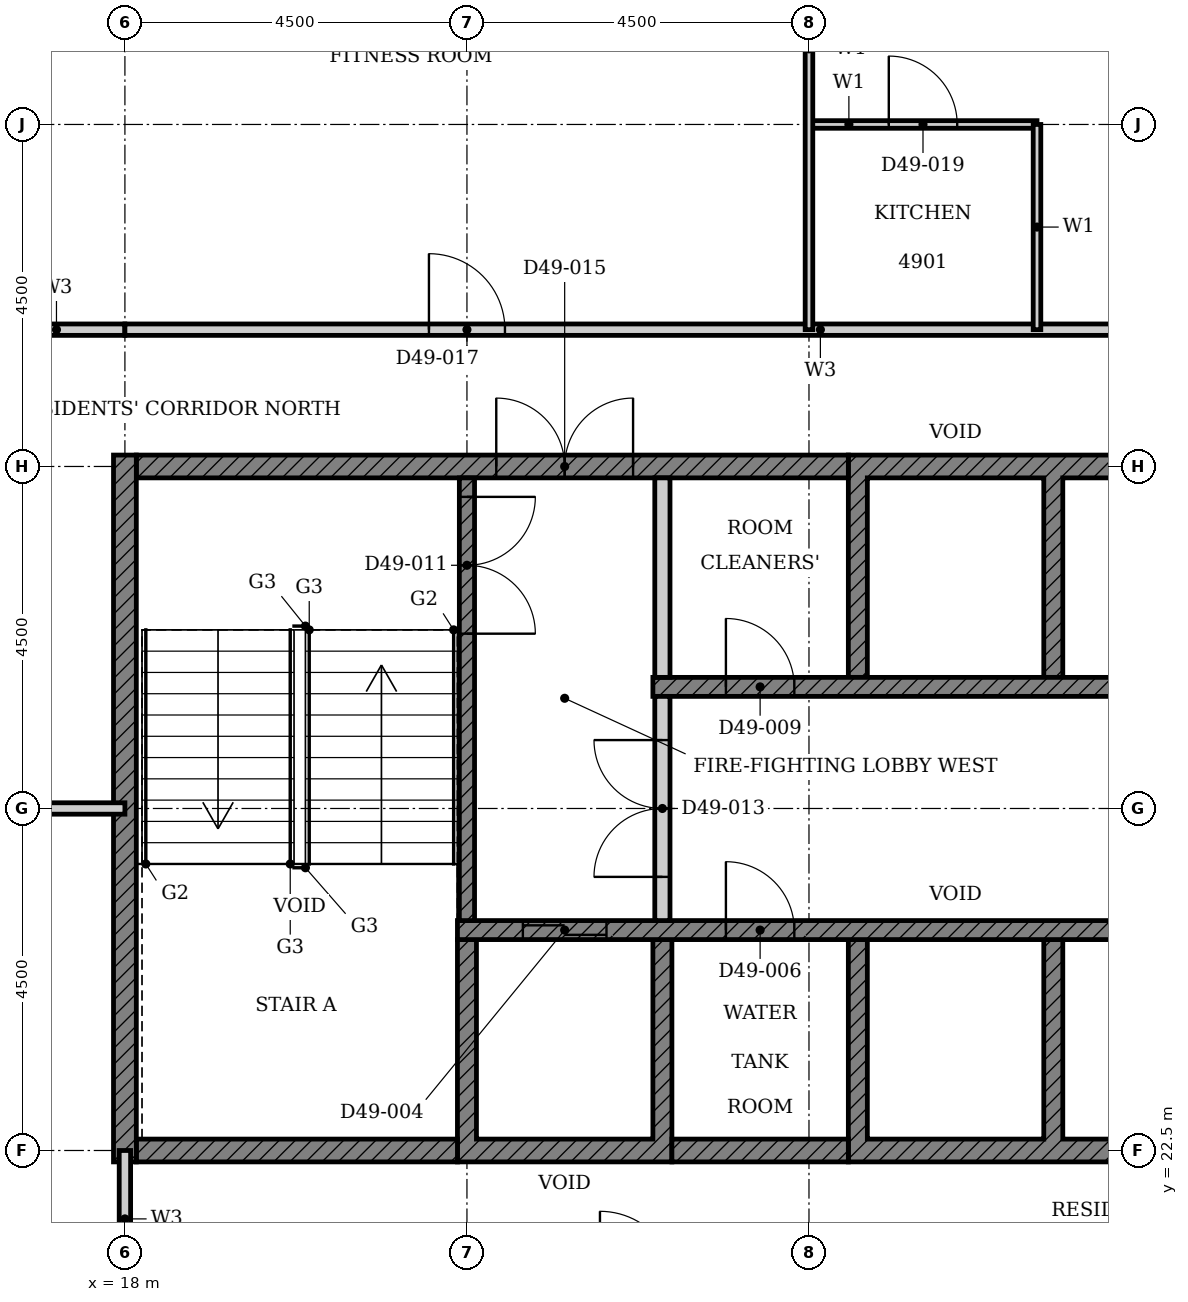
"""IFC4 building model, lengths in metres.
Left out: names, types, materials, properties, quantities, classifications, styles, units other than length and angle.
Written with IfcOpenShell. Run it as: python <this file> out.ifc"""

import sys

from ifc_helpers import new_model, si_unit, direction, frame, frame_2d, origin, place, context, subcontext, project, spatial, polyline, rectangle, outline, extrude, element, fill, save


model = new_model("IFC4")
c1 = context("Model", 3, precision=1e-05, world=origin(), true_north=direction((0.0, 1.0)))
c2 = subcontext(c1, "Body", "Model", "MODEL_VIEW")
j1 = project(units=[si_unit("LENGTHUNIT", "METRE"), si_unit("PLANEANGLEUNIT", "RADIAN")], contexts=[c1])
p1 = place(None, origin())
s1 = spatial("IfcSite", under=j1, at=p1, CompositionType="ELEMENT")
p2 = place(p1, origin())
s2 = spatial("IfcBuilding", under=s1, at=p2, CompositionType="ELEMENT")
p3 = place(p2, frame((0.0, 0.0, 196.1)))
s3 = spatial("IfcBuildingStorey", under=s2, at=p3, CompositionType="ELEMENT", Elevation=196.1)
p4 = place(p3, origin())
e1 = element("IfcWall", 1, at=p4, inside=s3, PredefinedType="SHEAR", context=c2, shape_type="SweptSolid", body=[
    extrude(outline(polyline([(22.375, 22.35), (25.197, 22.35), (25.197, 25.275), (24.947, 25.275), (24.947, 22.65), (22.625, 22.65), (22.625, 25.275), (22.375, 25.275), (22.375, 22.35)])), origin(), (0.0, 0.0, 1.0), 3.4),
])
p5 = place(p3, origin())
e2 = element("IfcWall", 2, at=p5, inside=s3, PredefinedType="SHEAR", context=c2, shape_type="SweptSolid", body=[
    extrude(outline(polyline([(27.518, 22.35), (32.911, 22.35), (32.911, 25.275), (32.661, 25.275), (32.661, 22.65), (30.339, 22.65), (30.339, 25.275), (30.089, 25.275), (30.089, 22.65), (27.768, 22.65), (27.768, 25.275), (27.518, 25.275), (27.518, 22.35)])), origin(), (0.0, 0.0, 1.0), 3.4),
])
p6 = place(p3, origin())
e3 = element("IfcWall", 3, at=p6, inside=s3, PredefinedType="SHEAR", context=c2, shape_type="SweptSolid", body=[
    extrude(outline(polyline([(27.518, 28.725), (27.768, 28.725), (27.768, 31.35), (30.089, 31.35), (30.089, 28.725), (30.339, 28.725), (30.339, 31.35), (32.661, 31.35), (32.661, 28.725), (32.911, 28.725), (32.911, 31.65), (27.518, 31.65), (27.518, 28.725)])), origin(), (0.0, 0.0, 1.0), 3.4),
])
p7 = place(p3, frame((18.15, 22.5, 0.0), z_axis=(0.0, 0.0, 1.0), x_axis=(1.0, 0.0, 0.0)))
e4 = element("IfcWall", 4, at=p7, inside=s3, PredefinedType="SHEAR", context=c2, shape_type="SweptSolid", body=[
    extrude(rectangle(XDim=4.225, YDim=0.3, at=frame_2d((2.113, 0.0))), origin(), (0.0, 0.0, 1.0), 3.4),
])
p8 = place(p3, frame((25.197, 22.5, 0.0), z_axis=(0.0, 0.0, 1.0), x_axis=(1.0, 0.0, 0.0)))
e5 = element("IfcWall", 5, at=p8, inside=s3, PredefinedType="SHEAR", context=c2, shape_type="SweptSolid", body=[
    extrude(rectangle(XDim=2.321, YDim=0.3, at=frame_2d((1.161, 0.0))), origin(), (0.0, 0.0, 1.0), 3.4),
])
p9 = place(p3, frame((18.15, 31.5, 0.0), z_axis=(0.0, 0.0, 1.0), x_axis=(1.0, 0.0, 0.0)))
e6 = element("IfcWall", 6, at=p9, inside=s3, PredefinedType="SHEAR", context=c2, shape_type="SweptSolid", body=[
    extrude(rectangle(XDim=9.368, YDim=0.3, at=frame_2d((4.684, 0.0))), origin(), (0.0, 0.0, 1.0), 3.4),
])
p10 = place(p9, frame((4.736, 0.0, 0.0)))
e7 = element("IfcOpeningElement", 7, at=p10, cuts=e6, PredefinedType="OPENING", context=c2, shape_type="SweptSolid", body=[
    extrude(rectangle(XDim=1.8, YDim=2.1, at=frame_2d((0.9, 1.05))), frame((0.0, 0.16, 0.0), z_axis=(0.0, -1.0, 0.0), x_axis=(1.0, 0.0, 0.0)), (0.0, 0.0, 1.0), 0.32),
])
p11 = place(p3, frame((18.0, 22.35, 0.0), z_axis=(0.0, 0.0, 1.0), x_axis=(0.0, 1.0, 0.0)))
e8 = element("IfcWall", 8, at=p11, inside=s3, PredefinedType="SHEAR", context=c2, shape_type="SweptSolid", body=[
    extrude(rectangle(XDim=9.3, YDim=0.3, at=frame_2d((4.65, 0.0))), origin(), (0.0, 0.0, 1.0), 3.4),
])
p12 = place(p3, frame((22.375, 25.4, 0.0), z_axis=(0.0, 0.0, 1.0), x_axis=(1.0, 0.0, 0.0)))
e9 = element("IfcWall", 9, at=p12, inside=s3, PredefinedType="SHEAR", context=c2, shape_type="SweptSolid", body=[
    extrude(rectangle(XDim=15.678, YDim=0.25, at=frame_2d((7.839, 0.0))), origin(), (0.0, 0.0, 1.0), 3.4),
])
p13 = place(p12, frame((8.575, 0.0, 0.0)))
e10 = element("IfcOpeningElement", 10, at=p13, cuts=e9, PredefinedType="OPENING", context=c2, shape_type="SweptSolid", body=[
    extrude(rectangle(XDim=1.1, YDim=2.1, at=frame_2d((0.55, 1.05))), frame((0.0, 0.135, 0.0), z_axis=(0.0, -1.0, 0.0), x_axis=(1.0, 0.0, 0.0)), (0.0, 0.0, 1.0), 0.27),
])
p14 = place(p12, frame((0.861, 0.0, 0.0)))
e11 = element("IfcOpeningElement", 11, at=p14, cuts=e9, PredefinedType="OPENING", context=c2, shape_type="SweptSolid", body=[
    extrude(rectangle(XDim=1.1, YDim=2.1, at=frame_2d((0.55, 1.05))), frame((0.0, 0.135, 0.0), z_axis=(0.0, -1.0, 0.0), x_axis=(1.0, 0.0, 0.0)), (0.0, 0.0, 1.0), 0.27),
])
p15 = place(p12, frame((3.532, 0.0, 0.0)))
e12 = element("IfcOpeningElement", 12, at=p15, cuts=e9, PredefinedType="OPENING", context=c2, shape_type="SweptSolid", body=[
    extrude(rectangle(XDim=0.9, YDim=2.1, at=frame_2d((0.45, 1.05))), frame((0.0, 0.135, 0.0), z_axis=(0.0, -1.0, 0.0), x_axis=(1.0, 0.0, 0.0)), (0.0, 0.0, 1.0), 0.27),
])
p16 = place(p12, frame((11.246, 0.0, 0.0)))
e13 = element("IfcOpeningElement", 13, at=p16, cuts=e9, PredefinedType="OPENING", context=c2, shape_type="SweptSolid", body=[
    extrude(rectangle(XDim=0.9, YDim=2.1, at=frame_2d((0.45, 1.05))), frame((0.0, 0.135, 0.0), z_axis=(0.0, -1.0, 0.0), x_axis=(1.0, 0.0, 0.0)), (0.0, 0.0, 1.0), 0.27),
])
p17 = place(p12, frame((13.818, 0.0, 0.0)))
e14 = element("IfcOpeningElement", 14, at=p17, cuts=e9, PredefinedType="OPENING", context=c2, shape_type="SweptSolid", body=[
    extrude(rectangle(XDim=0.9, YDim=2.1, at=frame_2d((0.45, 1.05))), frame((0.0, 0.135, 0.0), z_axis=(0.0, -1.0, 0.0), x_axis=(1.0, 0.0, 0.0)), (0.0, 0.0, 1.0), 0.27),
])
p18 = place(p3, frame((24.947, 28.6, 0.0), z_axis=(0.0, 0.0, 1.0), x_axis=(1.0, 0.0, 0.0)))
e15 = element("IfcWall", 15, at=p18, inside=s3, PredefinedType="SHEAR", context=c2, shape_type="SweptSolid", body=[
    extrude(rectangle(XDim=15.678, YDim=0.25, at=frame_2d((7.839, 0.0))), origin(), (0.0, 0.0, 1.0), 3.4),
])
p19 = place(p18, frame((6.004, 0.0, 0.0)))
e16 = element("IfcOpeningElement", 16, at=p19, cuts=e15, PredefinedType="OPENING", context=c2, shape_type="SweptSolid", body=[
    extrude(rectangle(XDim=1.1, YDim=2.1, at=frame_2d((0.55, 1.05))), frame((0.0, 0.135, 0.0), z_axis=(0.0, -1.0, 0.0), x_axis=(1.0, 0.0, 0.0)), (0.0, 0.0, 1.0), 0.27),
])
p20 = place(p18, frame((11.146, 0.0, 0.0)))
e17 = element("IfcOpeningElement", 17, at=p20, cuts=e15, PredefinedType="OPENING", context=c2, shape_type="SweptSolid", body=[
    extrude(rectangle(XDim=1.1, YDim=2.1, at=frame_2d((0.55, 1.05))), frame((0.0, 0.135, 0.0), z_axis=(0.0, -1.0, 0.0), x_axis=(1.0, 0.0, 0.0)), (0.0, 0.0, 1.0), 0.27),
])
p21 = place(p18, frame((13.718, 0.0, 0.0)))
e18 = element("IfcOpeningElement", 18, at=p21, cuts=e15, PredefinedType="OPENING", context=c2, shape_type="SweptSolid", body=[
    extrude(rectangle(XDim=1.1, YDim=2.1, at=frame_2d((0.55, 1.05))), frame((0.0, 0.135, 0.0), z_axis=(0.0, -1.0, 0.0), x_axis=(1.0, 0.0, 0.0)), (0.0, 0.0, 1.0), 0.27),
])
p22 = place(p18, frame((0.961, 0.0, 0.0)))
e19 = element("IfcOpeningElement", 19, at=p22, cuts=e15, PredefinedType="OPENING", context=c2, shape_type="SweptSolid", body=[
    extrude(rectangle(XDim=0.9, YDim=2.1, at=frame_2d((0.45, 1.05))), frame((0.0, 0.135, 0.0), z_axis=(0.0, -1.0, 0.0), x_axis=(1.0, 0.0, 0.0)), (0.0, 0.0, 1.0), 0.27),
])
p23 = place(p18, frame((8.675, 0.0, 0.0)))
e20 = element("IfcOpeningElement", 20, at=p23, cuts=e15, PredefinedType="OPENING", context=c2, shape_type="SweptSolid", body=[
    extrude(rectangle(XDim=0.9, YDim=2.1, at=frame_2d((0.45, 1.05))), frame((0.0, 0.135, 0.0), z_axis=(0.0, -1.0, 0.0), x_axis=(1.0, 0.0, 0.0)), (0.0, 0.0, 1.0), 0.27),
])
p24 = place(p3, frame((25.072, 28.725, 0.0), z_axis=(0.0, 0.0, 1.0), x_axis=(0.0, 1.0, 0.0)))
e21 = element("IfcWall", 21, at=p24, inside=s3, PredefinedType="PARTITIONING", context=c2, shape_type="SweptSolid", body=[
    extrude(rectangle(XDim=2.625, YDim=0.2, at=frame_2d((1.312, 0.0))), origin(), (0.0, 0.0, 1.0), 3.4),
])
p25 = place(p3, frame((22.5, 31.35, 0.0), z_axis=(0.0, 0.0, 1.0), x_axis=(0.0, -1.0, 0.0)))
e22 = element("IfcWall", 22, at=p25, inside=s3, PredefinedType="SHEAR", context=c2, shape_type="SweptSolid", body=[
    extrude(rectangle(XDim=5.825, YDim=0.2, at=frame_2d((2.913, 0.0))), origin(), (0.0, 0.0, 1.0), 3.4),
])
p26 = place(p25, frame((0.25, 0.0, 0.0)))
e23 = element("IfcOpeningElement", 23, at=p26, cuts=e22, PredefinedType="OPENING", context=c2, shape_type="SweptSolid", body=[
    extrude(rectangle(XDim=1.8, YDim=2.1, at=frame_2d((0.9, 1.05))), frame((0.0, 0.11, 0.0), z_axis=(0.0, -1.0, 0.0), x_axis=(1.0, 0.0, 0.0)), (0.0, 0.0, 1.0), 0.22),
])
p27 = place(p3, frame((25.072, 25.525, 0.0), z_axis=(0.0, 0.0, 1.0), x_axis=(0.0, 1.0, 0.0)))
e24 = element("IfcWall", 24, at=p27, inside=s3, PredefinedType="PARTITIONING", context=c2, shape_type="SweptSolid", body=[
    extrude(rectangle(XDim=2.95, YDim=0.2, at=frame_2d((1.475, 0.0))), origin(), (0.0, 0.0, 1.0), 3.4),
])
p28 = place(p27, frame((0.575, 0.0, 0.0)))
e25 = element("IfcOpeningElement", 25, at=p28, cuts=e24, PredefinedType="OPENING", context=c2, shape_type="SweptSolid", body=[
    extrude(rectangle(XDim=1.8, YDim=2.1, at=frame_2d((0.9, 1.05))), frame((0.0, 0.11, 0.0), z_axis=(0.0, -1.0, 0.0), x_axis=(1.0, 0.0, 0.0)), (0.0, 0.0, 1.0), 0.22),
])
p29 = place(p3, frame((4.5, 27.0, 0.0), z_axis=(0.0, 0.0, 1.0), x_axis=(1.0, 0.0, 0.0)))
e26 = element("IfcWall", 26, at=p29, inside=s3, PredefinedType="PARTITIONING", context=c2, shape_type="SweptSolid", body=[
    extrude(rectangle(XDim=13.5, YDim=0.15, at=frame_2d((6.75, 0.0))), origin(), (0.0, 0.0, 1.0), 2.68),
])
p30 = place(p29, frame((5.35, 0.0, 0.0)))
e27 = element("IfcOpeningElement", 27, at=p30, cuts=e26, PredefinedType="OPENING", context=c2, shape_type="SweptSolid", body=[
    extrude(rectangle(XDim=1.0, YDim=2.1, at=frame_2d((0.5, 1.05))), frame((0.0, 0.085, 0.0), z_axis=(0.0, -1.0, 0.0), x_axis=(1.0, 0.0, 0.0)), (0.0, 0.0, 1.0), 0.17),
])
p31 = place(p3, frame((16.2, 33.3, 0.0), z_axis=(0.0, 0.0, 1.0), x_axis=(1.0, 0.0, 0.0)))
e28 = element("IfcWall", 28, at=p31, inside=s3, PredefinedType="PARTITIONING", context=c2, shape_type="SweptSolid", body=[
    extrude(rectangle(XDim=1.799, YDim=0.15, at=frame_2d((0.899, 0.0))), origin(), (0.0, 0.0, 1.0), 3.4),
])
p32 = place(p3, frame((18.0, 33.3, 0.0), z_axis=(0.0, 0.0, 1.0), x_axis=(1.0, 0.0, 0.0)))
e29 = element("IfcWall", 29, at=p32, inside=s3, PredefinedType="PARTITIONING", context=c2, shape_type="SweptSolid", body=[
    extrude(rectangle(XDim=15.6, YDim=0.15, at=frame_2d((7.8, 0.0))), origin(), (0.0, 0.0, 1.0), 3.4),
])
p33 = place(p32, frame((4.0, 0.0, 0.0)))
e30 = element("IfcOpeningElement", 30, at=p33, cuts=e29, PredefinedType="OPENING", context=c2, shape_type="SweptSolid", body=[
    extrude(rectangle(XDim=1.0, YDim=2.1, at=frame_2d((0.5, 1.05))), frame((0.0, 0.085, 0.0), z_axis=(0.0, -1.0, 0.0), x_axis=(1.0, 0.0, 0.0)), (0.0, 0.0, 1.0), 0.17),
])
p34 = place(p32, frame((13.3, 0.0, 0.0)))
e31 = element("IfcOpeningElement", 31, at=p34, cuts=e29, PredefinedType="OPENING", context=c2, shape_type="SweptSolid", body=[
    extrude(rectangle(XDim=1.0, YDim=2.2, at=frame_2d((0.5, 1.1))), frame((0.0, 0.085, 0.0), z_axis=(0.0, -1.0, 0.0), x_axis=(1.0, 0.0, 0.0)), (0.0, 0.0, 1.0), 0.17),
])
p35 = place(p3, frame((18.0, 20.7, 0.0), z_axis=(0.0, 0.0, 1.0), x_axis=(0.0, 1.0, 0.0)))
e32 = element("IfcWall", 32, at=p35, inside=s3, PredefinedType="PARTITIONING", context=c2, shape_type="SweptSolid", body=[
    extrude(rectangle(XDim=1.8, YDim=0.15, at=frame_2d((0.9, 0.0))), origin(), (0.0, 0.0, 1.0), 3.4),
])
p36 = place(p3, frame((27.0, 36.0, 0.0), z_axis=(0.0, 0.0, 1.0), x_axis=(1.0, 0.0, 0.0)))
e33 = element("IfcWall", 33, at=p36, inside=s3, PredefinedType="PARTITIONING", context=c2, shape_type="SweptSolid", body=[
    extrude(rectangle(XDim=3.0, YDim=0.1, at=frame_2d((1.5, 0.0))), origin(), (0.0, 0.0, 1.0), 3.4),
])
p37 = place(p36, frame((1.05, 0.0, 0.0)))
e34 = element("IfcOpeningElement", 34, at=p37, cuts=e33, PredefinedType="OPENING", context=c2, shape_type="SweptSolid", body=[
    extrude(rectangle(XDim=0.9, YDim=2.1, at=frame_2d((0.45, 1.05))), frame((0.0, 0.06, 0.0), z_axis=(0.0, -1.0, 0.0), x_axis=(1.0, 0.0, 0.0)), (0.0, 0.0, 1.0), 0.12),
])
p38 = place(p3, frame((27.0, 33.3, 0.0), z_axis=(0.0, 0.0, 1.0), x_axis=(0.0, 1.0, 0.0)))
e35 = element("IfcWall", 35, at=p38, inside=s3, PredefinedType="PARTITIONING", context=c2, shape_type="SweptSolid", body=[
    extrude(rectangle(XDim=7.39, YDim=0.1, at=frame_2d((3.695, 0.0))), origin(), (0.0, 0.0, 1.0), 3.4),
])
p39 = place(p3, frame((30.0, 33.3, 0.0), z_axis=(0.0, 0.0, 1.0), x_axis=(0.0, 1.0, 0.0)))
e36 = element("IfcWall", 36, at=p39, inside=s3, PredefinedType="PARTITIONING", context=c2, shape_type="SweptSolid", body=[
    extrude(rectangle(XDim=2.7, YDim=0.1, at=frame_2d((1.35, 0.0))), origin(), (0.0, 0.0, 1.0), 3.4),
])
p40 = place(p14, origin())
e37 = element("IfcDoor", 37, at=p40, inside=s3, OperationType="DOUBLE_DOOR_SLIDING", PredefinedType="DOOR", context=c2, shape_type="SweptSolid", body=[
    extrude(rectangle(XDim=1.1, YDim=2.1, at=frame_2d((0.55, 1.05))), frame((0.0, 0.025, 0.0), z_axis=(0.0, -1.0, 0.0), x_axis=(1.0, 0.0, 0.0)), (0.0, 0.0, 1.0), 0.05),
])
fill(e11, e37)
p41 = place(p15, origin())
e38 = element("IfcDoor", 38, at=p41, inside=s3, OperationType="SINGLE_SWING_LEFT", PredefinedType="DOOR", context=c2, shape_type="SweptSolid", body=[
    extrude(rectangle(XDim=0.9, YDim=2.1, at=frame_2d((0.45, 1.05))), frame((0.0, 0.025, 0.0), z_axis=(0.0, -1.0, 0.0), x_axis=(1.0, 0.0, 0.0)), (0.0, 0.0, 1.0), 0.05),
])
fill(e12, e38)
p42 = place(p22, origin())
e39 = element("IfcDoor", 39, at=p42, inside=s3, OperationType="SINGLE_SWING_LEFT", PredefinedType="DOOR", context=c2, shape_type="SweptSolid", body=[
    extrude(rectangle(XDim=0.9, YDim=2.1, at=frame_2d((0.45, 1.05))), frame((0.0, 0.025, 0.0), z_axis=(0.0, -1.0, 0.0), x_axis=(1.0, 0.0, 0.0)), (0.0, 0.0, 1.0), 0.05),
])
fill(e19, e39)
p43 = place(p26, origin())
e40 = element("IfcDoor", 40, at=p43, inside=s3, OperationType="DOUBLE_DOOR_SINGLE_SWING", PredefinedType="DOOR", context=c2, shape_type="SweptSolid", body=[
    extrude(rectangle(XDim=1.8, YDim=2.1, at=frame_2d((0.9, 1.05))), frame((0.0, 0.025, 0.0), z_axis=(0.0, -1.0, 0.0), x_axis=(1.0, 0.0, 0.0)), (0.0, 0.0, 1.0), 0.05),
])
fill(e23, e40)
p44 = place(p28, origin())
e41 = element("IfcDoor", 41, at=p44, inside=s3, OperationType="DOUBLE_DOOR_SINGLE_SWING", PredefinedType="DOOR", context=c2, shape_type="SweptSolid", body=[
    extrude(rectangle(XDim=1.8, YDim=2.1, at=frame_2d((0.9, 1.05))), frame((0.0, 0.025, 0.0), z_axis=(0.0, -1.0, 0.0), x_axis=(1.0, 0.0, 0.0)), (0.0, 0.0, 1.0), 0.05),
])
fill(e25, e41)
p45 = place(p10, origin())
e42 = element("IfcDoor", 42, at=p45, inside=s3, OperationType="DOUBLE_DOOR_SINGLE_SWING", PredefinedType="DOOR", context=c2, shape_type="SweptSolid", body=[
    extrude(rectangle(XDim=1.8, YDim=2.1, at=frame_2d((0.9, 1.05))), frame((0.0, 0.025, 0.0), z_axis=(0.0, -1.0, 0.0), x_axis=(1.0, 0.0, 0.0)), (0.0, 0.0, 1.0), 0.05),
])
fill(e7, e42)
p46 = place(p33, origin())
e43 = element("IfcDoor", 43, at=p46, inside=s3, OperationType="SINGLE_SWING_LEFT", PredefinedType="DOOR", context=c2, shape_type="SweptSolid", body=[
    extrude(rectangle(XDim=1.0, YDim=2.1, at=frame_2d((0.5, 1.05))), frame((0.0, 0.025, 0.0), z_axis=(0.0, -1.0, 0.0), x_axis=(1.0, 0.0, 0.0)), (0.0, 0.0, 1.0), 0.05),
])
fill(e30, e43)
p47 = place(p37, origin())
e44 = element("IfcDoor", 44, at=p47, inside=s3, OperationType="SINGLE_SWING_LEFT", PredefinedType="DOOR", context=c2, shape_type="SweptSolid", body=[
    extrude(rectangle(XDim=0.9, YDim=2.1, at=frame_2d((0.45, 1.05))), frame((0.0, 0.025, 0.0), z_axis=(0.0, -1.0, 0.0), x_axis=(1.0, 0.0, 0.0)), (0.0, 0.0, 1.0), 0.05),
])
fill(e34, e44)
save(model, sys.argv[1])
